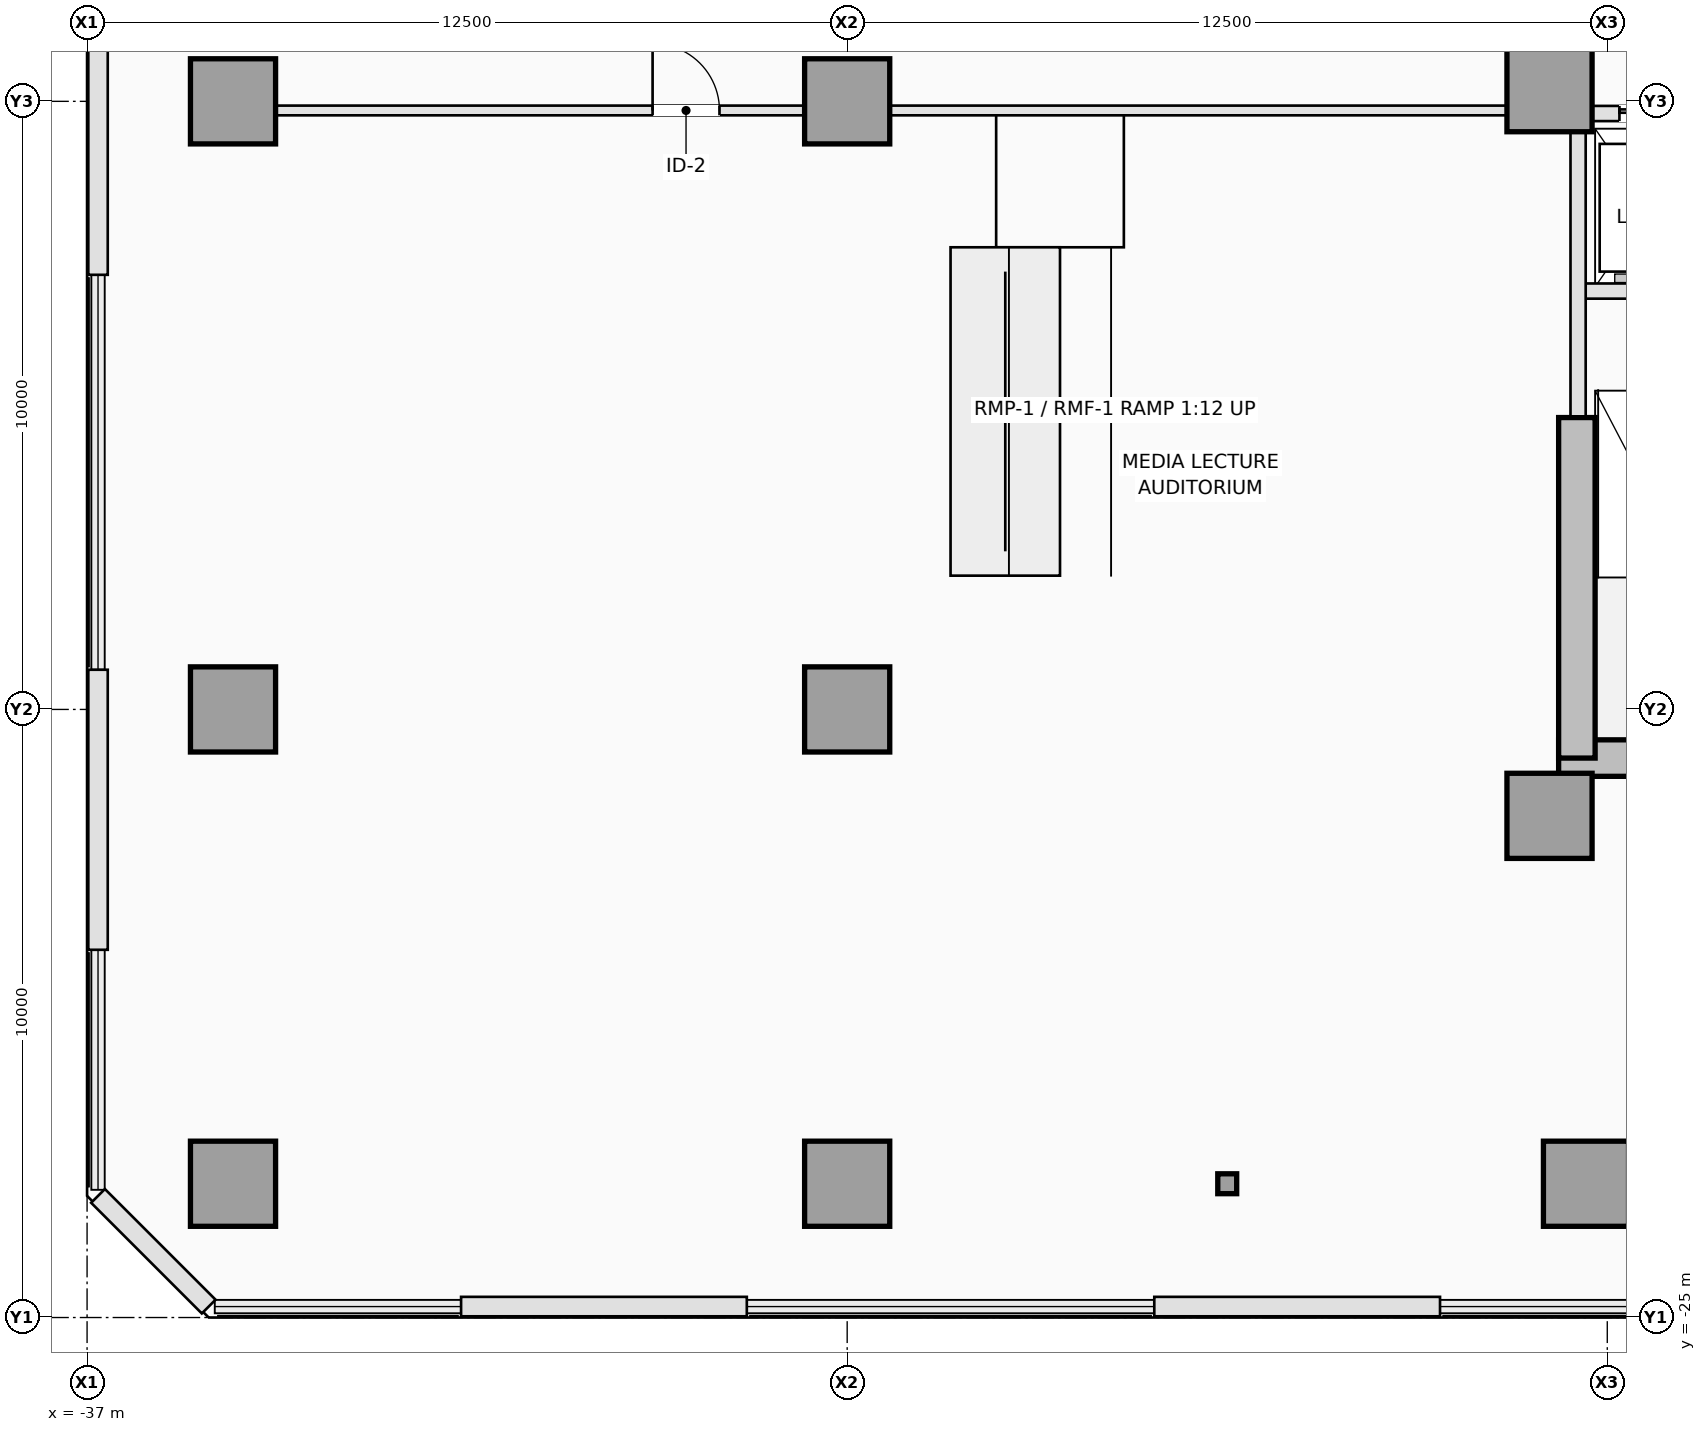
"""IFC4 building model, lengths in metres.
Left out: names, types, materials, properties, quantities, classifications, styles, units other than length and angle.
Written with IfcOpenShell. Run it as: python <this file> out.ifc"""

import sys

from ifc_helpers import new_model, si_unit, direction, frame, frame_2d, origin, origin_2d, place, context, subcontext, project, spatial, rectangle, i_section, extrude, element, fill, save


model = new_model("IFC4")
c1 = context("Model", 3, precision=1e-05, world=origin(), true_north=direction((0.0, 1.0)))
c2 = subcontext(c1, "Body", "Model", "MODEL_VIEW")
j1 = project(units=[si_unit("LENGTHUNIT", "METRE"), si_unit("PLANEANGLEUNIT", "RADIAN")], contexts=[c1])
p1 = place(None, origin())
s1 = spatial("IfcSite", under=j1, at=p1, CompositionType="ELEMENT")
p2 = place(p1, origin())
s2 = spatial("IfcBuilding", under=s1, at=p2, CompositionType="ELEMENT")
p3 = place(p2, frame((0.0, 0.0, 9.5)))
s3 = spatial("IfcBuildingStorey", under=s2, at=p3, CompositionType="ELEMENT", Elevation=9.5)
p4 = place(p3, frame((-12.8, -15.8, 0.0), z_axis=(0.0, 0.0, 1.0), x_axis=(1.0, 0.0, 0.0)))
e1 = element("IfcWall", 1, at=p4, inside=s3, PredefinedType="SHEAR", context=c2, shape_type="SweptSolid", body=[
    extrude(rectangle(XDim=4.2, YDim=0.6, at=frame_2d((2.1, 0.0))), origin(), (0.0, 0.0, 1.0), 4.5),
])
p5 = place(p3, frame((-12.5, -15.8, 0.0), z_axis=(0.0, 0.0, 1.0), x_axis=(0.0, 1.0, 0.0)))
e2 = element("IfcWall", 2, at=p5, inside=s3, PredefinedType="SHEAR", context=c2, shape_type="SweptSolid", body=[
    extrude(rectangle(XDim=5.6, YDim=0.6, at=frame_2d((2.8, 0.0))), origin(), (0.0, 0.0, 1.0), 4.5),
])
for number, where, z_axis, x_axis in (
    (3, (-12.95, -16.75, 0.0), (0.0, 0.0, 1.0), (1.0, 0.0, 0.0)),
    (4, (-12.95, -4.8, 0.0), (0.0, 0.0, 1.0), (1.0, 0.0, 0.0)),
    (5, (-34.6, -22.8, 0.0), (0.0, 0.0, 1.0), (1.0, 0.0, 0.0)),
    (6, (-24.5, -22.8, 0.0), (0.0, 0.0, 1.0), (1.0, 0.0, 0.0)),
    (7, (-12.35, -22.8, 0.0), (0.0, 0.0, 1.0), (1.0, 0.0, 0.0)),
    (8, (-34.6, -15.0, 0.0), (0.0, 0.0, 1.0), (1.0, 0.0, 0.0)),
    (9, (-24.5, -15.0, 0.0), (0.0, 0.0, 1.0), (1.0, 0.0, 0.0)),
    (10, (-34.6, -5.0, 0.0), (0.0, 0.0, 1.0), (1.0, 0.0, 0.0)),
    (11, (-24.5, -5.0, 0.0), (0.0, 0.0, 1.0), (1.0, 0.0, 0.0)),
):
    element("IfcColumn", number, at=place(p3, frame(where, z_axis=z_axis, x_axis=x_axis)), inside=s3, PredefinedType="COLUMN", context=c2, shape_type="SweptSolid", body=[
        extrude(rectangle(XDim=1.4, YDim=1.4, at=origin_2d()), origin(), (0.0, 0.0, 1.0), 4.5),
    ])
p6 = place(p3, frame((-18.25, -22.8, 0.0), z_axis=(0.0, 0.0, 1.0), x_axis=(1.0, 0.0, 0.0)))
e12 = element("IfcColumn", 12, at=p6, inside=s3, PredefinedType="COLUMN", context=c2, shape_type="SweptSolid", body=[
    extrude(i_section(OverallWidth=0.311, OverallDepth=0.327, WebThickness=0.016, FlangeThickness=0.025, FilletRadius=0.017, at=origin_2d()), origin(), (0.0, 0.0, 1.0), 4.5),
])
p7 = place(p3, frame((-14.75, -24.82, 0.0), z_axis=(0.0, 0.0, 1.0), x_axis=(-1.0, 0.0, 0.0)))
e13 = element("IfcWall", 13, at=p7, inside=s3, PredefinedType="STANDARD", context=c2, shape_type="SweptSolid", body=[
    extrude(rectangle(XDim=4.699, YDim=0.32, at=frame_2d((2.35, 0.0))), origin(), (0.0, 0.0, 1.0), 4.2),
])
p8 = place(p3, frame((-26.15, -24.82, 0.0), z_axis=(0.0, 0.0, 1.0), x_axis=(-1.0, 0.0, 0.0)))
e14 = element("IfcWall", 14, at=p8, inside=s3, PredefinedType="STANDARD", context=c2, shape_type="SweptSolid", body=[
    extrude(rectangle(XDim=4.699, YDim=0.32, at=frame_2d((2.35, 0.0))), origin(), (0.0, 0.0, 1.0), 4.2),
])
p9 = place(p3, frame((-36.82, -18.953, 0.0), z_axis=(0.0, 0.0, 1.0), x_axis=(0.0, 1.0, 0.0)))
e15 = element("IfcWall", 15, at=p9, inside=s3, PredefinedType="STANDARD", context=c2, shape_type="SweptSolid", body=[
    extrude(rectangle(XDim=4.605, YDim=0.32, at=frame_2d((2.303, 0.0))), origin(), (0.0, 0.0, 1.0), 4.2),
])
p10 = place(p3, frame((-36.82, -7.853, 0.0), z_axis=(0.0, 0.0, 1.0), x_axis=(0.0, 1.0, 0.0)))
e16 = element("IfcWall", 16, at=p10, inside=s3, PredefinedType="STANDARD", context=c2, shape_type="SweptSolid", body=[
    extrude(rectangle(XDim=4.605, YDim=0.32, at=frame_2d((2.303, 0.0))), origin(), (0.0, 0.0, 1.0), 4.2),
])
p11 = place(p3, frame((-35.0, -24.82, 0.0), z_axis=(0.0, 0.0, 1.0), x_axis=(-0.707106781187, 0.707106781187, 0.0)))
e17 = element("IfcWall", 17, at=p11, inside=s3, PredefinedType="STANDARD", context=c2, shape_type="SweptSolid", body=[
    extrude(rectangle(XDim=2.574, YDim=0.32, at=frame_2d((1.287, 0.0))), origin(), (0.0, 0.0, 1.0), 4.2),
])
p12 = place(p3, frame((-12.38, -8.12, 0.0), z_axis=(0.0, 0.0, 1.0), x_axis=(1.0, 0.0, 0.0)))
e18 = element("IfcWall", 18, at=p12, inside=s3, PredefinedType="PARTITIONING", context=c2, shape_type="SweptSolid", body=[
    extrude(rectangle(XDim=3.22, YDim=0.25, at=frame_2d((1.61, 0.0))), origin(), (0.0, 0.0, 1.0), 4.2),
])
p13 = place(p3, frame((-12.48, -10.18, 0.0), z_axis=(0.0, 0.0, 1.0), x_axis=(0.0, 1.0, 0.0)))
e19 = element("IfcWall", 19, at=p13, inside=s3, PredefinedType="PARTITIONING", context=c2, shape_type="SweptSolid", body=[
    extrude(rectangle(XDim=4.678, YDim=0.25, at=frame_2d((2.339, 0.0))), origin(), (0.0, 0.0, 1.0), 4.2),
])
p14 = place(p3, frame((-12.248, -5.2, 0.0), z_axis=(0.0, 0.0, 1.0), x_axis=(1.0, 0.0, 0.0)))
e20 = element("IfcWall", 20, at=p14, inside=s3, PredefinedType="PARTITIONING", context=c2, shape_type="SweptSolid", body=[
    extrude(rectangle(XDim=7.796, YDim=0.25, at=frame_2d((3.898, 0.0))), origin(), (0.0, 0.0, 1.0), 4.2),
])
p15 = place(p14, frame((0.448, 0.0, 0.0)))
e21 = element("IfcOpeningElement", 21, at=p15, cuts=e20, PredefinedType="OPENING", context=c2, shape_type="SweptSolid", body=[
    extrude(rectangle(XDim=1.0, YDim=2.15, at=frame_2d((0.5, 1.075))), frame((0.0, 0.135, 0.0), z_axis=(0.0, -1.0, 0.0), x_axis=(1.0, 0.0, 0.0)), (0.0, 0.0, 1.0), 0.27),
])
p16 = place(p14, frame((2.398, 0.0, 0.0)))
e22 = element("IfcOpeningElement", 22, at=p16, cuts=e20, PredefinedType="OPENING", context=c2, shape_type="SweptSolid", body=[
    extrude(rectangle(XDim=1.0, YDim=2.15, at=frame_2d((0.5, 1.075))), frame((0.0, 0.135, 0.0), z_axis=(0.0, -1.0, 0.0), x_axis=(1.0, 0.0, 0.0)), (0.0, 0.0, 1.0), 0.27),
])
p17 = place(p14, frame((4.348, 0.0, 0.0)))
e23 = element("IfcOpeningElement", 23, at=p17, cuts=e20, PredefinedType="OPENING", context=c2, shape_type="SweptSolid", body=[
    extrude(rectangle(XDim=1.0, YDim=2.15, at=frame_2d((0.5, 1.075))), frame((0.0, 0.135, 0.0), z_axis=(0.0, -1.0, 0.0), x_axis=(1.0, 0.0, 0.0)), (0.0, 0.0, 1.0), 0.27),
])
p18 = place(p14, frame((6.298, 0.0, 0.0)))
e24 = element("IfcOpeningElement", 24, at=p18, cuts=e20, PredefinedType="OPENING", context=c2, shape_type="SweptSolid", body=[
    extrude(rectangle(XDim=1.0, YDim=2.15, at=frame_2d((0.5, 1.075))), frame((0.0, 0.135, 0.0), z_axis=(0.0, -1.0, 0.0), x_axis=(1.0, 0.0, 0.0)), (0.0, 0.0, 1.0), 0.27),
])
p19 = place(p3, frame((-33.898, -5.15, 0.0), z_axis=(0.0, 0.0, 1.0), x_axis=(1.0, 0.0, 0.0)))
e25 = element("IfcWall", 25, at=p19, inside=s3, PredefinedType="PARTITIONING", context=c2, shape_type="SweptSolid", body=[
    extrude(rectangle(XDim=8.696, YDim=0.16, at=frame_2d((4.348, 0.0))), origin(), (0.0, 0.0, 1.0), 3.176),
])
p20 = place(p19, frame((6.198, 0.0, 0.0)))
e26 = element("IfcOpeningElement", 26, at=p20, cuts=e25, PredefinedType="OPENING", context=c2, shape_type="SweptSolid", body=[
    extrude(rectangle(XDim=1.1, YDim=2.15, at=frame_2d((0.55, 1.075))), frame((0.0, 0.09, 0.0), z_axis=(0.0, -1.0, 0.0), x_axis=(1.0, 0.0, 0.0)), (0.0, 0.0, 1.0), 0.18),
])
p21 = place(p3, frame((-23.798, -5.15, 0.0), z_axis=(0.0, 0.0, 1.0), x_axis=(1.0, 0.0, 0.0)))
e27 = element("IfcWall", 27, at=p21, inside=s3, PredefinedType="PARTITIONING", context=c2, shape_type="SweptSolid", body=[
    extrude(rectangle(XDim=10.146, YDim=0.16, at=frame_2d((5.073, 0.0))), origin(), (0.0, 0.0, 1.0), 3.176),
])
p22 = place(p15, origin())
e28 = element("IfcDoor", 28, at=p22, inside=s3, OperationType="SLIDING_TO_LEFT", PredefinedType="DOOR", context=c2, shape_type="SweptSolid", body=[
    extrude(rectangle(XDim=1.0, YDim=2.15, at=frame_2d((0.5, 1.075))), frame((0.0, 0.025, 0.0), z_axis=(0.0, -1.0, 0.0), x_axis=(1.0, 0.0, 0.0)), (0.0, 0.0, 1.0), 0.05),
])
fill(e21, e28)
p23 = place(p20, origin())
e29 = element("IfcDoor", 29, at=p23, inside=s3, OperationType="SINGLE_SWING_LEFT", PredefinedType="DOOR", context=c2, shape_type="SweptSolid", body=[
    extrude(rectangle(XDim=1.1, YDim=2.15, at=frame_2d((0.55, 1.075))), frame((0.0, 0.025, 0.0), z_axis=(0.0, -1.0, 0.0), x_axis=(1.0, 0.0, 0.0)), (0.0, 0.0, 1.0), 0.05),
])
fill(e26, e29)
save(model, sys.argv[1])
